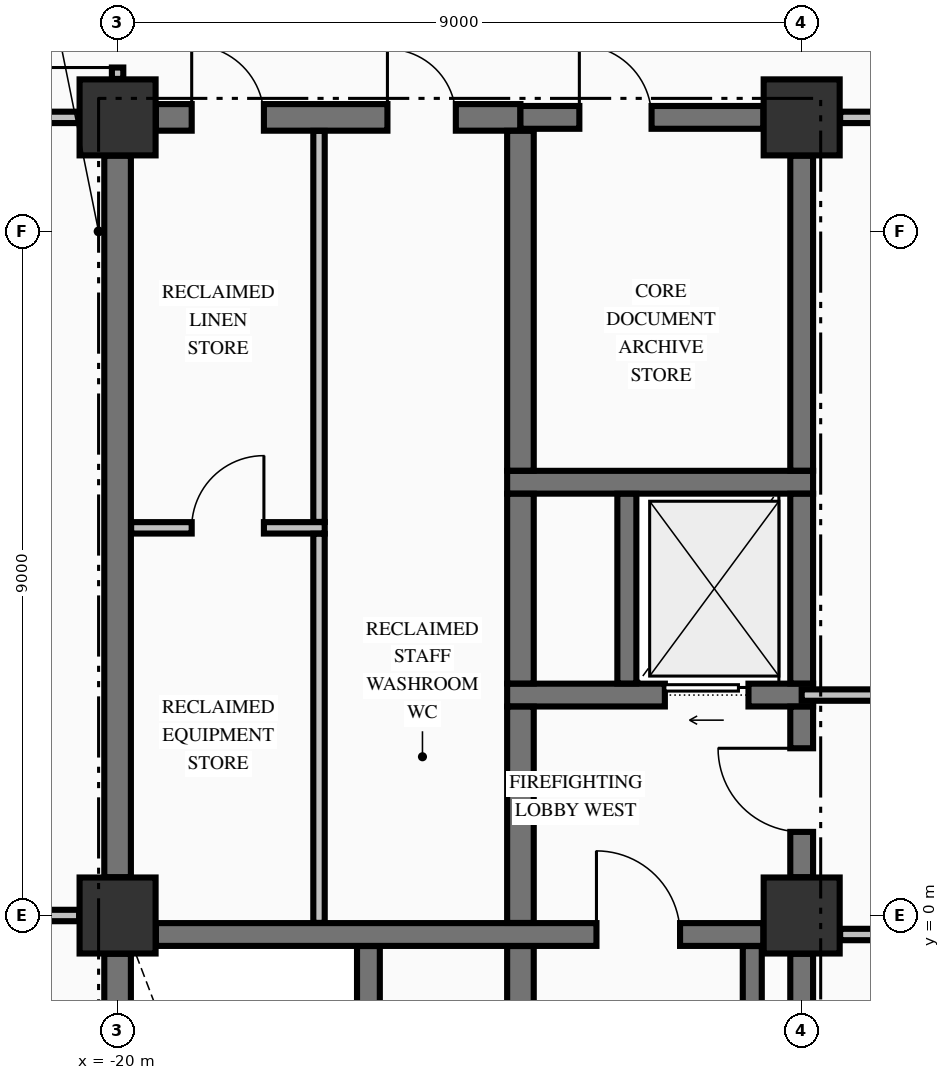
"""IFC4 building model, lengths in metres.
Left out: names, types, materials, properties, quantities, classifications, styles, units other than length and angle.
Written with IfcOpenShell. Run it as: python <this file> out.ifc"""

import sys

from ifc_helpers import new_model, si_unit, direction, frame, frame_2d, origin, origin_2d, place, context, subcontext, project, spatial, rectangle, extrude, element, fill, save


model = new_model("IFC4")
c1 = context("Model", 3, precision=1e-05, world=origin(), true_north=direction((0.0, 1.0)))
c2 = subcontext(c1, "Body", "Model", "MODEL_VIEW")
j1 = project(units=[si_unit("LENGTHUNIT", "METRE"), si_unit("PLANEANGLEUNIT", "RADIAN")], contexts=[c1])
p1 = place(None, origin())
s1 = spatial("IfcSite", under=j1, at=p1, CompositionType="ELEMENT")
p2 = place(p1, origin())
s2 = spatial("IfcBuilding", under=s1, at=p2, CompositionType="ELEMENT")
p3 = place(p2, frame((0.0, 0.0, 142.77)))
s3 = spatial("IfcBuildingStorey", under=s2, at=p3, CompositionType="ELEMENT", Elevation=142.77)
for number, where, z_axis, x_axis in (
    (1, (-20.0, 10.5, -0.325), (0.0, 0.0, 1.0), (1.0, 0.0, 0.0)),
    (2, (-11.0, 0.0, -0.325), (0.0, 0.0, 1.0), (1.0, 0.0, 0.0)),
    (3, (-11.0, 10.5, -0.325), (0.0, 0.0, 1.0), (1.0, 0.0, 0.0)),
    (4, (-20.0, 0.0, -0.325), (0.0, 0.0, 1.0), (1.0, 0.0, 0.0)),
):
    element("IfcColumn", number, at=place(p3, frame(where, z_axis=z_axis, x_axis=x_axis)), inside=s3, PredefinedType="COLUMN", context=c2, shape_type="SweptSolid", body=[
        extrude(rectangle(XDim=1.0, YDim=1.0, at=origin_2d()), origin(), (0.0, 0.0, 1.0), 3.645),
    ])
p4 = place(p3, frame((-19.496, -0.25, 0.0), z_axis=(0.0, 0.0, 1.0), x_axis=(1.0, 0.0, 0.0)))
e5 = element("IfcWall", 5, at=p4, inside=s3, PredefinedType="SHEAR", context=c2, shape_type="SweptSolid", body=[
    extrude(rectangle(XDim=7.992, YDim=0.3, at=frame_2d((3.996, 0.0))), origin(), (0.0, 0.0, 1.0), 3.32),
])
p5 = place(p4, frame((5.796, 0.0, 0.0)))
e6 = element("IfcOpeningElement", 6, at=p5, cuts=e5, PredefinedType="OPENING", context=c2, shape_type="SweptSolid", body=[
    extrude(rectangle(XDim=1.1, YDim=2.15, at=frame_2d((0.55, 1.075))), frame((0.0, 0.16, 0.0), z_axis=(0.0, -1.0, 0.0), x_axis=(1.0, 0.0, 0.0)), (0.0, 0.0, 1.0), 0.32),
])
p6 = place(p3, frame((-14.875, 2.9, 0.0), z_axis=(0.0, 0.0, 1.0), x_axis=(1.0, 0.0, 0.0)))
e7 = element("IfcWall", 7, at=p6, inside=s3, PredefinedType="SHEAR", context=c2, shape_type="SweptSolid", body=[
    extrude(rectangle(XDim=4.025, YDim=0.3, at=frame_2d((2.012, 0.0))), origin(), (0.0, 0.0, 1.0), 3.32),
])
p7 = place(p6, frame((2.075, 0.0, 0.0)))
e8 = element("IfcOpeningElement", 8, at=p7, cuts=e7, PredefinedType="OPENING", context=c2, shape_type="SweptSolid", body=[
    extrude(rectangle(XDim=1.1, YDim=2.2, at=frame_2d((0.55, 1.1))), frame((0.0, 0.16, 0.0), z_axis=(0.0, -1.0, 0.0), x_axis=(1.0, 0.0, 0.0)), (0.0, 0.0, 1.0), 0.32),
])
p8 = place(p3, frame((-14.875, 5.7, 0.0), z_axis=(0.0, 0.0, 1.0), x_axis=(1.0, 0.0, 0.0)))
e9 = element("IfcWall", 9, at=p8, inside=s3, PredefinedType="SHEAR", context=c2, shape_type="SweptSolid", body=[
    extrude(rectangle(XDim=4.025, YDim=0.3, at=frame_2d((2.012, 0.0))), origin(), (0.0, 0.0, 1.0), 3.32),
])
p9 = place(p3, frame((-19.496, 10.5, 0.0), z_axis=(0.0, 0.0, 1.0), x_axis=(1.0, 0.0, 0.0)))
e10 = element("IfcWall", 10, at=p9, inside=s3, PredefinedType="SHEAR", context=c2, shape_type="SweptSolid", body=[
    extrude(rectangle(XDim=4.796, YDim=0.35, at=frame_2d((2.398, 0.0))), origin(), (0.0, 0.0, 1.0), 3.32),
])
p10 = place(p9, frame((0.471, 0.0, 0.0)))
e11 = element("IfcOpeningElement", 11, at=p10, cuts=e10, PredefinedType="OPENING", context=c2, shape_type="SweptSolid", body=[
    extrude(rectangle(XDim=0.95, YDim=2.15, at=frame_2d((0.475, 1.075))), frame((0.0, 0.185, 0.0), z_axis=(0.0, -1.0, 0.0), x_axis=(1.0, 0.0, 0.0)), (0.0, 0.0, 1.0), 0.37),
])
p11 = place(p9, frame((3.046, 0.0, 0.0)))
e12 = element("IfcOpeningElement", 12, at=p11, cuts=e10, PredefinedType="OPENING", context=c2, shape_type="SweptSolid", body=[
    extrude(rectangle(XDim=0.9, YDim=2.15, at=frame_2d((0.45, 1.075))), frame((0.0, 0.185, 0.0), z_axis=(0.0, -1.0, 0.0), x_axis=(1.0, 0.0, 0.0)), (0.0, 0.0, 1.0), 0.37),
])
p12 = place(p3, frame((-14.7, 10.5, 0.0), z_axis=(0.0, 0.0, 1.0), x_axis=(1.0, 0.0, 0.0)))
e13 = element("IfcWall", 13, at=p12, inside=s3, PredefinedType="SHEAR", context=c2, shape_type="SweptSolid", body=[
    extrude(rectangle(XDim=3.196, YDim=0.3, at=frame_2d((1.598, 0.0))), origin(), (0.0, 0.0, 1.0), 3.32),
])
p13 = place(p12, frame((0.775, 0.0, 0.0)))
e14 = element("IfcOpeningElement", 14, at=p13, cuts=e13, PredefinedType="OPENING", context=c2, shape_type="SweptSolid", body=[
    extrude(rectangle(XDim=0.95, YDim=2.15, at=frame_2d((0.475, 1.075))), frame((0.0, 0.16, 0.0), z_axis=(0.0, -1.0, 0.0), x_axis=(1.0, 0.0, 0.0)), (0.0, 0.0, 1.0), 0.32),
])
p14 = place(p3, frame((-10.494, -0.25, 0.0), z_axis=(0.0, 0.0, 1.0), x_axis=(1.0, 0.0, 0.0)))
e15 = element("IfcWall", 15, at=p14, inside=s3, PredefinedType="PARTITIONING", context=c2, shape_type="SweptSolid", body=[
    extrude(rectangle(XDim=20.988, YDim=0.15, at=frame_2d((10.494, 0.0))), origin(), (0.0, 0.0, 1.0), 3.32),
])
p15 = place(p14, frame((8.194, 0.0, 0.0)))
e16 = element("IfcOpeningElement", 16, at=p15, cuts=e15, PredefinedType="OPENING", context=c2, shape_type="SweptSolid", body=[
    extrude(rectangle(XDim=1.1, YDim=2.15, at=frame_2d((0.55, 1.075))), frame((0.0, 0.085, 0.0), z_axis=(0.0, -1.0, 0.0), x_axis=(1.0, 0.0, 0.0)), (0.0, 0.0, 1.0), 0.17),
])
p16 = place(p14, frame((3.049, 0.0, 0.0)))
e17 = element("IfcOpeningElement", 17, at=p16, cuts=e15, PredefinedType="OPENING", context=c2, shape_type="SweptSolid", body=[
    extrude(rectangle(XDim=1.05, YDim=2.15, at=frame_2d((0.525, 1.075))), frame((0.0, 0.085, 0.0), z_axis=(0.0, -1.0, 0.0), x_axis=(1.0, 0.0, 0.0)), (0.0, 0.0, 1.0), 0.17),
])
p17 = place(p14, frame((15.189, 0.0, 0.0)))
e18 = element("IfcOpeningElement", 18, at=p17, cuts=e15, PredefinedType="OPENING", context=c2, shape_type="SweptSolid", body=[
    extrude(rectangle(XDim=0.95, YDim=2.15, at=frame_2d((0.475, 1.075))), frame((0.0, 0.085, 0.0), z_axis=(0.0, -1.0, 0.0), x_axis=(1.0, 0.0, 0.0)), (0.0, 0.0, 1.0), 0.17),
])
p18 = place(p3, frame((-27.394, 0.0, 0.0), z_axis=(0.0, 0.0, 1.0), x_axis=(1.0, 0.0, 0.0)))
e19 = element("IfcWall", 19, at=p18, inside=s3, PredefinedType="PARTITIONING", context=c2, shape_type="SweptSolid", body=[
    extrude(rectangle(XDim=6.888, YDim=0.15, at=frame_2d((3.444, 0.0))), origin(), (0.0, 0.0, 1.0), 2.81),
])
p19 = place(p3, frame((-11.0, 2.9, 0.0), z_axis=(0.0, 0.0, 1.0), x_axis=(1.0, 0.0, 0.0)))
e20 = element("IfcWall", 20, at=p19, inside=s3, PredefinedType="PARTITIONING", context=c2, shape_type="SweptSolid", body=[
    extrude(rectangle(XDim=22.0, YDim=0.15, at=frame_2d((11.0, 0.0))), origin(), (0.0, 0.0, 1.0), 3.32),
])
p20 = place(p19, frame((8.7, 0.0, 0.0)))
e21 = element("IfcOpeningElement", 21, at=p20, cuts=e20, PredefinedType="OPENING", context=c2, shape_type="SweptSolid", body=[
    extrude(rectangle(XDim=1.1, YDim=2.15, at=frame_2d((0.55, 1.075))), frame((0.0, 0.085, 0.0), z_axis=(0.0, -1.0, 0.0), x_axis=(1.0, 0.0, 0.0)), (0.0, 0.0, 1.0), 0.17),
])
p21 = place(p19, frame((3.555, 0.0, 0.0)))
e22 = element("IfcOpeningElement", 22, at=p21, cuts=e20, PredefinedType="OPENING", context=c2, shape_type="SweptSolid", body=[
    extrude(rectangle(XDim=1.05, YDim=2.15, at=frame_2d((0.525, 1.075))), frame((0.0, 0.085, 0.0), z_axis=(0.0, -1.0, 0.0), x_axis=(1.0, 0.0, 0.0)), (0.0, 0.0, 1.0), 0.17),
])
p22 = place(p19, frame((15.62, 0.0, 0.0)))
e23 = element("IfcOpeningElement", 23, at=p22, cuts=e20, PredefinedType="OPENING", context=c2, shape_type="SweptSolid", body=[
    extrude(rectangle(XDim=1.1, YDim=2.15, at=frame_2d((0.55, 1.075))), frame((0.0, 0.085, 0.0), z_axis=(0.0, -1.0, 0.0), x_axis=(1.0, 0.0, 0.0)), (0.0, 0.0, 1.0), 0.17),
])
p23 = place(p3, frame((-19.822, 5.1, 0.0), z_axis=(0.0, 0.0, 1.0), x_axis=(1.0, 0.0, 0.0)))
e24 = element("IfcWall", 24, at=p23, inside=s3, PredefinedType="PARTITIONING", context=c2, shape_type="SweptSolid", body=[
    extrude(rectangle(XDim=2.547, YDim=0.15, at=frame_2d((1.273, 0.0))), origin(), (0.0, 0.0, 1.0), 3.32),
])
p24 = place(p23, frame((0.797, 0.0, 0.0)))
e25 = element("IfcOpeningElement", 25, at=p24, cuts=e24, PredefinedType="OPENING", context=c2, shape_type="SweptSolid", body=[
    extrude(rectangle(XDim=0.95, YDim=2.15, at=frame_2d((0.475, 1.075))), frame((0.0, 0.085, 0.0), z_axis=(0.0, -1.0, 0.0), x_axis=(1.0, 0.0, 0.0)), (0.0, 0.0, 1.0), 0.17),
])
p25 = place(p3, frame((-27.835, 10.5, 0.0), z_axis=(0.0, 0.0, 1.0), x_axis=(1.0, 0.0, 0.0)))
e26 = element("IfcWall", 26, at=p25, inside=s3, PredefinedType="PARTITIONING", context=c2, shape_type="SweptSolid", body=[
    extrude(rectangle(XDim=7.329, YDim=0.15, at=frame_2d((3.665, 0.0))), origin(), (0.0, 0.0, 1.0), 3.32),
])
p26 = place(p25, frame((3.36, 0.0, 0.0)))
e27 = element("IfcOpeningElement", 27, at=p26, cuts=e26, PredefinedType="OPENING", context=c2, shape_type="SweptSolid", body=[
    extrude(rectangle(XDim=0.95, YDim=2.15, at=frame_2d((0.475, 1.075))), frame((0.0, 0.085, 0.0), z_axis=(0.0, -1.0, 0.0), x_axis=(1.0, 0.0, 0.0)), (0.0, 0.0, 1.0), 0.17),
])
p27 = place(p3, frame((-10.494, 10.5, 0.0), z_axis=(0.0, 0.0, 1.0), x_axis=(1.0, 0.0, 0.0)))
e28 = element("IfcWall", 28, at=p27, inside=s3, PredefinedType="PARTITIONING", context=c2, shape_type="SweptSolid", body=[
    extrude(rectangle(XDim=20.988, YDim=0.15, at=frame_2d((10.494, 0.0))), origin(), (0.0, 0.0, 1.0), 3.32),
])
p28 = place(p27, frame((8.194, 0.0, 0.0)))
e29 = element("IfcOpeningElement", 29, at=p28, cuts=e28, PredefinedType="OPENING", context=c2, shape_type="SweptSolid", body=[
    extrude(rectangle(XDim=1.1, YDim=2.15, at=frame_2d((0.55, 1.075))), frame((0.0, 0.085, 0.0), z_axis=(0.0, -1.0, 0.0), x_axis=(1.0, 0.0, 0.0)), (0.0, 0.0, 1.0), 0.17),
])
p29 = place(p3, frame((-20.0, -9.446, 0.0), z_axis=(0.0, 0.0, 1.0), x_axis=(0.0, 1.0, 0.0)))
e30 = element("IfcWall", 30, at=p29, inside=s3, PredefinedType="SHEAR", context=c2, shape_type="SweptSolid", body=[
    extrude(rectangle(XDim=8.942, YDim=0.35, at=frame_2d((4.471, 0.0))), origin(), (0.0, 0.0, 1.0), 3.32),
])
p30 = place(p3, frame((-20.0, 0.504, 0.0), z_axis=(0.0, 0.0, 1.0), x_axis=(0.0, 1.0, 0.0)))
e31 = element("IfcWall", 31, at=p30, inside=s3, PredefinedType="SHEAR", context=c2, shape_type="SweptSolid", body=[
    extrude(rectangle(XDim=9.492, YDim=0.35, at=frame_2d((4.746, 0.0))), origin(), (0.0, 0.0, 1.0), 3.32),
])
p31 = place(p3, frame((-16.7, -9.773, 0.0), z_axis=(0.0, 0.0, 1.0), x_axis=(0.0, 1.0, 0.0)))
e32 = element("IfcWall", 32, at=p31, inside=s3, PredefinedType="SHEAR", context=c2, shape_type="SweptSolid", body=[
    extrude(rectangle(XDim=9.371, YDim=0.3, at=frame_2d((4.686, 0.0))), origin(), (0.0, 0.0, 1.0), 3.32),
])
p32 = place(p3, frame((-14.7, -9.773, 0.0), z_axis=(0.0, 0.0, 1.0), x_axis=(0.0, 1.0, 0.0)))
e33 = element("IfcWall", 33, at=p32, inside=s3, PredefinedType="SHEAR", context=c2, shape_type="SweptSolid", body=[
    extrude(rectangle(XDim=9.371, YDim=0.35, at=frame_2d((4.686, 0.0))), origin(), (0.0, 0.0, 1.0), 3.32),
])
p33 = place(p3, frame((-14.7, -0.098, 0.0), z_axis=(0.0, 0.0, 1.0), x_axis=(0.0, 1.0, 0.0)))
e34 = element("IfcWall", 34, at=p33, inside=s3, PredefinedType="SHEAR", context=c2, shape_type="SweptSolid", body=[
    extrude(rectangle(XDim=2.846, YDim=0.35, at=frame_2d((1.423, 0.0))), origin(), (0.0, 0.0, 1.0), 3.32),
])
p34 = place(p3, frame((-14.7, 3.052, 0.0), z_axis=(0.0, 0.0, 1.0), x_axis=(0.0, 1.0, 0.0)))
e35 = element("IfcWall", 35, at=p34, inside=s3, PredefinedType="SHEAR", context=c2, shape_type="SweptSolid", body=[
    extrude(rectangle(XDim=2.496, YDim=0.35, at=frame_2d((1.248, 0.0))), origin(), (0.0, 0.0, 1.0), 3.32),
])
p35 = place(p3, frame((-14.7, 5.852, 0.0), z_axis=(0.0, 0.0, 1.0), x_axis=(0.0, 1.0, 0.0)))
e36 = element("IfcWall", 36, at=p35, inside=s3, PredefinedType="SHEAR", context=c2, shape_type="SweptSolid", body=[
    extrude(rectangle(XDim=4.471, YDim=0.35, at=frame_2d((2.235, 0.0))), origin(), (0.0, 0.0, 1.0), 3.32),
])
p36 = place(p3, frame((-13.3, 3.052, 0.0), z_axis=(0.0, 0.0, 1.0), x_axis=(0.0, 1.0, 0.0)))
e37 = element("IfcWall", 37, at=p36, inside=s3, PredefinedType="SOLIDWALL", context=c2, shape_type="SweptSolid", body=[
    extrude(rectangle(XDim=2.496, YDim=0.25, at=frame_2d((1.248, 0.0))), origin(), (0.0, 0.0, 1.0), 3.32),
])
p37 = place(p3, frame((-11.65, -9.798, 0.0), z_axis=(0.0, 0.0, 1.0), x_axis=(0.0, 1.0, 0.0)))
e38 = element("IfcWall", 38, at=p37, inside=s3, PredefinedType="SOLIDWALL", context=c2, shape_type="SweptSolid", body=[
    extrude(rectangle(XDim=9.396, YDim=0.25, at=frame_2d((4.698, 0.0))), origin(), (0.0, 0.0, 1.0), 3.32),
])
p38 = place(p3, frame((-11.0, -9.446, 0.0), z_axis=(0.0, 0.0, 1.0), x_axis=(0.0, 1.0, 0.0)))
e39 = element("IfcWall", 39, at=p38, inside=s3, PredefinedType="SHEAR", context=c2, shape_type="SweptSolid", body=[
    extrude(rectangle(XDim=8.942, YDim=0.3, at=frame_2d((4.471, 0.0))), origin(), (0.0, 0.0, 1.0), 3.32),
])
p39 = place(p3, frame((-11.0, 0.504, 0.0), z_axis=(0.0, 0.0, 1.0), x_axis=(0.0, 1.0, 0.0)))
e40 = element("IfcWall", 40, at=p39, inside=s3, PredefinedType="SHEAR", context=c2, shape_type="SweptSolid", body=[
    extrude(rectangle(XDim=2.244, YDim=0.3, at=frame_2d((1.122, 0.0))), origin(), (0.0, 0.0, 1.0), 3.32),
])
p40 = place(p39, frame((0.596, 0.0, 0.0)))
e41 = element("IfcOpeningElement", 41, at=p40, cuts=e40, PredefinedType="OPENING", context=c2, shape_type="SweptSolid", body=[
    extrude(rectangle(XDim=1.1, YDim=2.15, at=frame_2d((0.55, 1.075))), frame((0.0, 0.16, 0.0), z_axis=(0.0, -1.0, 0.0), x_axis=(1.0, 0.0, 0.0)), (0.0, 0.0, 1.0), 0.32),
])
p41 = place(p3, frame((-11.0, 3.052, 0.0), z_axis=(0.0, 0.0, 1.0), x_axis=(0.0, 1.0, 0.0)))
e42 = element("IfcWall", 42, at=p41, inside=s3, PredefinedType="SHEAR", context=c2, shape_type="SweptSolid", body=[
    extrude(rectangle(XDim=2.496, YDim=0.3, at=frame_2d((1.248, 0.0))), origin(), (0.0, 0.0, 1.0), 3.32),
])
p42 = place(p3, frame((-11.0, 5.852, 0.0), z_axis=(0.0, 0.0, 1.0), x_axis=(0.0, 1.0, 0.0)))
e43 = element("IfcWall", 43, at=p42, inside=s3, PredefinedType="SHEAR", context=c2, shape_type="SweptSolid", body=[
    extrude(rectangle(XDim=4.144, YDim=0.3, at=frame_2d((2.072, 0.0))), origin(), (0.0, 0.0, 1.0), 3.32),
])
p43 = place(p3, frame((-20.0, 11.006, 0.0), z_axis=(0.0, 0.0, 1.0), x_axis=(0.0, 1.0, 0.0)))
e44 = element("IfcWall", 44, at=p43, inside=s3, PredefinedType="PARTITIONING", context=c2, shape_type="SweptSolid", body=[
    extrude(rectangle(XDim=1.466, YDim=0.15, at=frame_2d((0.733, 0.0))), origin(), (0.0, 0.0, 1.0), 2.81),
])
p44 = place(p43, frame((0.15, 0.0, 0.0)))
e45 = element("IfcOpeningElement", 45, at=p44, cuts=e44, PredefinedType="OPENING", context=c2, shape_type="SweptSolid", body=[
    extrude(rectangle(XDim=0.95, YDim=2.15, at=frame_2d((0.475, 1.075))), frame((0.0, 0.085, 0.0), z_axis=(0.0, -1.0, 0.0), x_axis=(1.0, 0.0, 0.0)), (0.0, 0.0, 1.0), 0.17),
])
p45 = place(p3, frame((-17.35, -0.097, 0.0), z_axis=(0.0, 0.0, 1.0), x_axis=(0.0, 1.0, 0.0)))
e46 = element("IfcWall", 46, at=p45, inside=s3, PredefinedType="PARTITIONING", context=c2, shape_type="SweptSolid", body=[
    extrude(rectangle(XDim=5.119, YDim=0.15, at=frame_2d((2.56, 0.0))), origin(), (0.0, 0.0, 1.0), 3.32),
])
p46 = place(p3, frame((-17.35, 5.178, 0.0), z_axis=(0.0, 0.0, 1.0), x_axis=(0.0, 1.0, 0.0)))
e47 = element("IfcWall", 47, at=p46, inside=s3, PredefinedType="PARTITIONING", context=c2, shape_type="SweptSolid", body=[
    extrude(rectangle(XDim=5.144, YDim=0.15, at=frame_2d((2.572, 0.0))), origin(), (0.0, 0.0, 1.0), 3.32),
])
p47 = place(p5, origin())
e48 = element("IfcDoor", 48, at=p47, inside=s3, OperationType="SINGLE_SWING_LEFT", PredefinedType="DOOR", context=c2, shape_type="SweptSolid", body=[
    extrude(rectangle(XDim=1.1, YDim=2.15, at=frame_2d((0.55, 1.075))), frame((0.0, 0.025, 0.0), z_axis=(0.0, -1.0, 0.0), x_axis=(1.0, 0.0, 0.0)), (0.0, 0.0, 1.0), 0.05),
])
fill(e6, e48)
p48 = place(p40, origin())
e49 = element("IfcDoor", 49, at=p48, inside=s3, OperationType="SINGLE_SWING_RIGHT", PredefinedType="DOOR", context=c2, shape_type="SweptSolid", body=[
    extrude(rectangle(XDim=1.1, YDim=2.15, at=frame_2d((0.55, 1.075))), frame((0.0, 0.025, 0.0), z_axis=(0.0, -1.0, 0.0), x_axis=(1.0, 0.0, 0.0)), (0.0, 0.0, 1.0), 0.05),
])
fill(e41, e49)
p49 = place(p7, origin())
e50 = element("IfcDoor", 50, at=p49, inside=s3, OperationType="SLIDING_TO_LEFT", PredefinedType="DOOR", context=c2, shape_type="SweptSolid", body=[
    extrude(rectangle(XDim=1.1, YDim=2.2, at=frame_2d((0.55, 1.1))), frame((0.0, 0.025, 0.0), z_axis=(0.0, -1.0, 0.0), x_axis=(1.0, 0.0, 0.0)), (0.0, 0.0, 1.0), 0.05),
])
fill(e8, e50)
p50 = place(p13, origin())
e51 = element("IfcDoor", 51, at=p50, inside=s3, OperationType="SINGLE_SWING_LEFT", PredefinedType="DOOR", context=c2, shape_type="SweptSolid", body=[
    extrude(rectangle(XDim=0.95, YDim=2.15, at=frame_2d((0.475, 1.075))), frame((0.0, 0.025, 0.0), z_axis=(0.0, -1.0, 0.0), x_axis=(1.0, 0.0, 0.0)), (0.0, 0.0, 1.0), 0.05),
])
fill(e14, e51)
p51 = place(p10, origin())
e52 = element("IfcDoor", 52, at=p51, inside=s3, OperationType="SINGLE_SWING_LEFT", PredefinedType="DOOR", context=c2, shape_type="SweptSolid", body=[
    extrude(rectangle(XDim=0.95, YDim=2.15, at=frame_2d((0.475, 1.075))), frame((0.0, 0.025, 0.0), z_axis=(0.0, -1.0, 0.0), x_axis=(1.0, 0.0, 0.0)), (0.0, 0.0, 1.0), 0.05),
])
fill(e11, e52)
p52 = place(p24, origin())
e53 = element("IfcDoor", 53, at=p52, inside=s3, OperationType="SINGLE_SWING_RIGHT", PredefinedType="DOOR", context=c2, shape_type="SweptSolid", body=[
    extrude(rectangle(XDim=0.95, YDim=2.15, at=frame_2d((0.475, 1.075))), frame((0.0, 0.025, 0.0), z_axis=(0.0, -1.0, 0.0), x_axis=(1.0, 0.0, 0.0)), (0.0, 0.0, 1.0), 0.05),
])
fill(e25, e53)
p53 = place(p11, origin())
e54 = element("IfcDoor", 54, at=p53, inside=s3, OperationType="SINGLE_SWING_LEFT", PredefinedType="DOOR", context=c2, shape_type="SweptSolid", body=[
    extrude(rectangle(XDim=0.9, YDim=2.15, at=frame_2d((0.45, 1.075))), frame((0.0, 0.025, 0.0), z_axis=(0.0, -1.0, 0.0), x_axis=(1.0, 0.0, 0.0)), (0.0, 0.0, 1.0), 0.05),
])
fill(e12, e54)
p54 = place(p44, origin())
e55 = element("IfcDoor", 55, at=p54, inside=s3, OperationType="SINGLE_SWING_LEFT", PredefinedType="DOOR", context=c2, shape_type="SweptSolid", body=[
    extrude(rectangle(XDim=0.95, YDim=2.15, at=frame_2d((0.475, 1.075))), frame((0.0, 0.025, 0.0), z_axis=(0.0, -1.0, 0.0), x_axis=(1.0, 0.0, 0.0)), (0.0, 0.0, 1.0), 0.05),
])
fill(e45, e55)
save(model, sys.argv[1])
